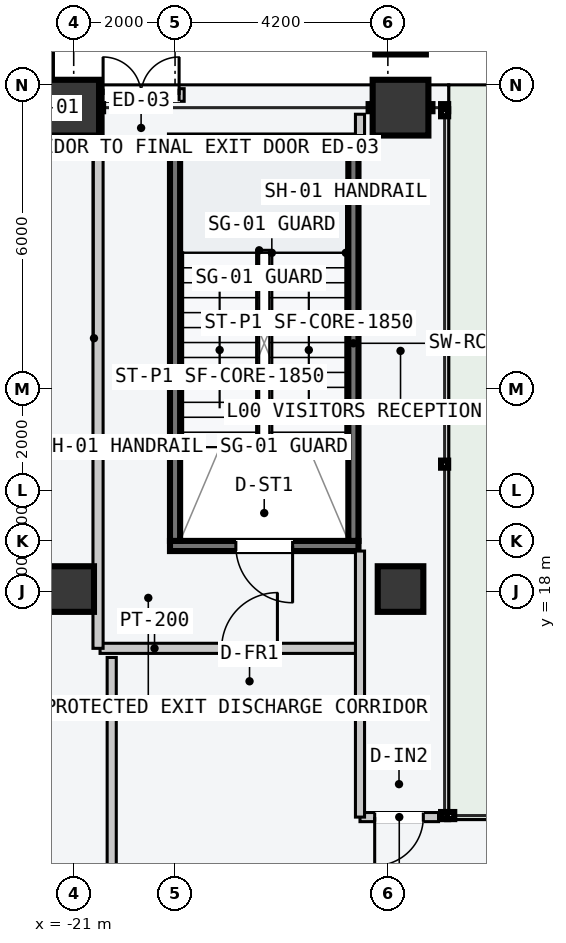
"""IFC4 building model, lengths in metres.
Left out: names, types, materials, properties, quantities, classifications, styles, units other than length and angle.
Written with IfcOpenShell. Run it as: python <this file> out.ifc"""

import sys

from ifc_helpers import new_model, si_unit, direction, frame, frame_2d, origin, origin_2d, place, context, subcontext, project, spatial, rectangle, hollow_rectangle, extrude, element, fill, save


model = new_model("IFC4")
c1 = context("Model", 3, precision=1e-05, world=origin(), true_north=direction((0.0, 1.0)))
c2 = subcontext(c1, "Body", "Model", "MODEL_VIEW")
j1 = project(units=[si_unit("LENGTHUNIT", "METRE"), si_unit("PLANEANGLEUNIT", "RADIAN")], contexts=[c1])
p1 = place(None, origin())
s1 = spatial("IfcSite", under=j1, at=p1, CompositionType="ELEMENT")
p2 = place(p1, origin())
s2 = spatial("IfcBuilding", under=s1, at=p2, CompositionType="ELEMENT")
p3 = place(p2, origin())
s3 = spatial("IfcBuildingStorey", under=s2, at=p3, CompositionType="ELEMENT", Elevation=0.0)
p4 = place(p3, frame((-15.38, 18.9, -0.22), z_axis=(0.0, 0.0, 1.0), x_axis=(-1.0, 0.0, 0.0)))
e1 = element("IfcWall", 1, at=p4, inside=s3, PredefinedType="SOLIDWALL", context=c2, shape_type="SweptSolid", body=[
    extrude(rectangle(XDim=3.72, YDim=0.2, at=frame_2d((1.86, 0.0))), origin(), (0.0, 0.0, 1.0), 4.8),
])
p5 = place(p4, frame((1.3, 0.0, 0.22)))
e2 = element("IfcOpeningElement", 2, at=p5, cuts=e1, PredefinedType="OPENING", context=c2, shape_type="SweptSolid", body=[
    extrude(rectangle(XDim=1.12, YDim=2.18, at=frame_2d((0.56, 1.09))), frame((0.0, 0.11, 0.0), z_axis=(0.0, -1.0, 0.0), x_axis=(1.0, 0.0, 0.0)), (0.0, 0.0, 1.0), 0.22),
])
p6 = place(p3, frame((-19.1, 26.9, -0.22), z_axis=(0.0, 0.0, 1.0), x_axis=(1.0, 0.0, 0.0)))
e3 = element("IfcWall", 3, at=p6, inside=s3, PredefinedType="SOLIDWALL", context=c2, shape_type="SweptSolid", body=[
    extrude(rectangle(XDim=3.72, YDim=0.2, at=frame_2d((1.86, 0.0))), origin(), (0.0, 0.0, 1.0), 4.8),
])
for number, where, z_axis, x_axis in (
    (4, (-19.0, 19.0, -0.22), (0.0, 0.0, 1.0), (0.0, 1.0, 0.0)),
    (5, (-15.48, 19.0, -0.22), (0.0, 0.0, 1.0), (0.0, 1.0, 0.0)),
):
    element("IfcWall", number, at=place(p3, frame(where, z_axis=z_axis, x_axis=x_axis)), inside=s3, PredefinedType="SOLIDWALL", context=c2, shape_type="SweptSolid", body=[
        extrude(rectangle(XDim=7.8, YDim=0.2, at=frame_2d((3.9, 0.0))), origin(), (0.0, 0.0, 1.0), 4.8),
    ])
for number, where, z_axis, x_axis in (
    (6, (-21.05, 18.05, 0.0), (0.0, 0.0, 1.0), (1.0, 0.0, 0.0)),
    (7, (-14.55, 18.05, 0.0), (0.0, 0.0, 1.0), (1.0, 0.0, 0.0)),
):
    element("IfcColumn", number, at=place(p3, frame(where, z_axis=z_axis, x_axis=x_axis)), inside=s3, PredefinedType="COLUMN", context=c2, shape_type="SweptSolid", body=[
        extrude(hollow_rectangle(XDim=0.9, YDim=0.9, WallThickness=0.045, at=origin_2d()), origin(), (0.0, 0.0, 1.0), 4.8),
    ])
for number, where, z_axis, x_axis in (
    (8, (-21.05, 27.55, 0.0), (0.0, 0.0, 1.0), (1.0, 0.0, 0.0)),
    (9, (-14.55, 27.55, 0.0), (0.0, 0.0, 1.0), (1.0, 0.0, 0.0)),
):
    element("IfcColumn", number, at=place(p3, frame(where, z_axis=z_axis, x_axis=x_axis)), inside=s3, PredefinedType="COLUMN", context=c2, shape_type="SweptSolid", body=[
        extrude(hollow_rectangle(XDim=1.1, YDim=1.1, WallThickness=0.055, at=origin_2d()), origin(), (0.0, 0.0, 1.0), 4.8),
    ])
p7 = place(p3, frame((-14.55, 29.1, -0.22), z_axis=(0.0, 0.0, 1.0), x_axis=(1.0, 0.0, 0.0)))
e10 = element("IfcColumn", 10, at=p7, inside=s3, PredefinedType="COLUMN", context=c2, shape_type="SweptSolid", body=[
    extrude(hollow_rectangle(XDim=1.0, YDim=1.0, WallThickness=0.05, at=origin_2d()), origin(), (0.0, 0.0, 1.0), 5.02),
])
p8 = place(p3, frame((-20.48, 16.88, 0.0), z_axis=(0.0, 0.0, 1.0), x_axis=(1.0, 0.0, 0.0)))
e11 = element("IfcWall", 11, at=p8, inside=s3, PredefinedType="PARTITIONING", context=c2, shape_type="SweptSolid", body=[
    extrude(rectangle(XDim=5.1, YDim=0.2, at=frame_2d((2.55, 0.0))), origin(), (0.0, 0.0, 1.0), 4.58),
])
p9 = place(p8, frame((2.4, 0.0, 0.0)))
e12 = element("IfcOpeningElement", 12, at=p9, cuts=e11, PredefinedType="OPENING", context=c2, shape_type="SweptSolid", body=[
    extrude(rectangle(XDim=1.1, YDim=2.15, at=frame_2d((0.55, 1.075))), frame((0.0, 0.11, 0.0), z_axis=(0.0, -1.0, 0.0), x_axis=(1.0, 0.0, 0.0)), (0.0, 0.0, 1.0), 0.22),
])
p10 = place(p3, frame((-20.52, 16.88, 0.0), z_axis=(0.0, 0.0, 1.0), x_axis=(0.0, 1.0, 0.0)))
e13 = element("IfcWall", 13, at=p10, inside=s3, PredefinedType="PARTITIONING", context=c2, shape_type="SweptSolid", body=[
    extrude(rectangle(XDim=10.77, YDim=0.2, at=frame_2d((5.385, 0.0))), origin(), (0.0, 0.0, 1.0), 4.58),
])
p11 = place(p3, frame((-20.25, -20.6, 0.0), z_axis=(0.0, 0.0, 1.0), x_axis=(0.0, 1.0, 0.0)))
e14 = element("IfcWall", 14, at=p11, inside=s3, PredefinedType="PARTITIONING", context=c2, shape_type="SweptSolid", body=[
    extrude(rectangle(XDim=37.3, YDim=0.18, at=frame_2d((18.65, 0.0))), origin(), (0.0, 0.0, 1.0), 4.58),
])
p12 = place(p11, frame((13.925, 0.0, 0.0)))
e15 = element("IfcOpeningElement", 15, at=p12, cuts=e14, PredefinedType="OPENING", context=c2, shape_type="SweptSolid", body=[
    extrude(rectangle(XDim=1.6, YDim=2.3, at=frame_2d((0.8, 1.15))), frame((0.0, 0.1, 0.0), z_axis=(0.0, -1.0, 0.0), x_axis=(1.0, 0.0, 0.0)), (0.0, 0.0, 1.0), 0.2),
])
p13 = place(p11, frame((28.975, 0.0, 0.0)))
e16 = element("IfcOpeningElement", 16, at=p13, cuts=e14, PredefinedType="OPENING", context=c2, shape_type="SweptSolid", body=[
    extrude(rectangle(XDim=1.6, YDim=2.3, at=frame_2d((0.8, 1.15))), frame((0.0, 0.1, 0.0), z_axis=(0.0, -1.0, 0.0), x_axis=(1.0, 0.0, 0.0)), (0.0, 0.0, 1.0), 0.2),
])
p14 = place(p3, frame((-13.8, 13.55, 0.0), z_axis=(0.0, 0.0, 1.0), x_axis=(-1.0, 0.0, 0.0)))
e17 = element("IfcWall", 17, at=p14, inside=s3, PredefinedType="PARTITIONING", context=c2, shape_type="SweptSolid", body=[
    extrude(rectangle(XDim=1.55, YDim=0.18, at=frame_2d((0.775, 0.0))), origin(), (0.0, 0.0, 1.0), 4.58),
])
p15 = place(p14, frame((0.3, 0.0, 0.0)))
e18 = element("IfcOpeningElement", 18, at=p15, cuts=e17, PredefinedType="OPENING", context=c2, shape_type="SweptSolid", body=[
    extrude(rectangle(XDim=0.96, YDim=2.18, at=frame_2d((0.48, 1.09))), frame((0.0, 0.1, 0.0), z_axis=(0.0, -1.0, 0.0), x_axis=(1.0, 0.0, 0.0)), (0.0, 0.0, 1.0), 0.2),
])
p16 = place(p3, frame((-15.35, 13.55, 0.0), z_axis=(0.0, 0.0, 1.0), x_axis=(0.0, 1.0, 0.0)))
e19 = element("IfcWall", 19, at=p16, inside=s3, PredefinedType="PARTITIONING", context=c2, shape_type="SweptSolid", body=[
    extrude(rectangle(XDim=5.25, YDim=0.18, at=frame_2d((2.625, 0.0))), origin(), (0.0, 0.0, 1.0), 4.58),
])
p17 = place(p3, frame((-15.35, 27.0, 0.0), z_axis=(0.0, 0.0, 1.0), x_axis=(0.0, 1.0, 0.0)))
e20 = element("IfcWall", 20, at=p17, inside=s3, PredefinedType="PARTITIONING", context=c2, shape_type="SweptSolid", body=[
    extrude(rectangle(XDim=0.42, YDim=0.18, at=frame_2d((0.21, 0.0))), origin(), (0.0, 0.0, 1.0), 4.58),
])
p18 = place(p3, frame((-20.52, 27.8, 0.0), z_axis=(0.0, 0.0, 1.0), x_axis=(1.0, 0.0, 0.0)))
e21 = element("IfcWall", 21, at=p18, inside=s3, PredefinedType="STANDARD", context=c2, shape_type="SweptSolid", body=[
    extrude(rectangle(XDim=1.7, YDim=0.25, at=frame_2d((0.85, 0.0))), origin(), (0.0, 0.0, 1.0), 4.58),
])
p19 = place(p18, frame((0.1, 0.0, 0.0)))
e22 = element("IfcOpeningElement", 22, at=p19, cuts=e21, PredefinedType="OPENING", context=c2, shape_type="SweptSolid", body=[
    extrude(rectangle(XDim=1.5, YDim=2.4, at=frame_2d((0.75, 1.2))), frame((0.0, 0.135, 0.0), z_axis=(0.0, -1.0, 0.0), x_axis=(1.0, 0.0, 0.0)), (0.0, 0.0, 1.0), 0.27),
])
p20 = place(p5, origin())
e23 = element("IfcDoor", 23, at=p20, inside=s3, OperationType="SINGLE_SWING_LEFT", PredefinedType="DOOR", context=c2, shape_type="SweptSolid", body=[
    extrude(rectangle(XDim=1.12, YDim=2.18, at=frame_2d((0.56, 1.09))), frame((0.0, 0.025, 0.0), z_axis=(0.0, -1.0, 0.0), x_axis=(1.0, 0.0, 0.0)), (0.0, 0.0, 1.0), 0.05),
])
fill(e2, e23)
p21 = place(p9, origin())
e24 = element("IfcDoor", 24, at=p21, inside=s3, OperationType="SINGLE_SWING_RIGHT", PredefinedType="DOOR", context=c2, shape_type="SweptSolid", body=[
    extrude(rectangle(XDim=1.1, YDim=2.15, at=frame_2d((0.55, 1.075))), frame((0.0, 0.025, 0.0), z_axis=(0.0, -1.0, 0.0), x_axis=(1.0, 0.0, 0.0)), (0.0, 0.0, 1.0), 0.05),
])
fill(e12, e24)
p22 = place(p15, origin())
e25 = element("IfcDoor", 25, at=p22, inside=s3, OperationType="SINGLE_SWING_RIGHT", PredefinedType="DOOR", context=c2, shape_type="SweptSolid", body=[
    extrude(rectangle(XDim=0.96, YDim=2.18, at=frame_2d((0.48, 1.09))), frame((0.0, 0.025, 0.0), z_axis=(0.0, -1.0, 0.0), x_axis=(1.0, 0.0, 0.0)), (0.0, 0.0, 1.0), 0.05),
])
fill(e18, e25)
p23 = place(p19, origin())
e26 = element("IfcDoor", 26, at=p23, inside=s3, OperationType="DOUBLE_DOOR_SINGLE_SWING", PredefinedType="DOOR", context=c2, shape_type="SweptSolid", body=[
    extrude(rectangle(XDim=1.5, YDim=2.4, at=frame_2d((0.75, 1.2))), frame((0.0, 0.025, 0.0), z_axis=(0.0, -1.0, 0.0), x_axis=(1.0, 0.0, 0.0)), (0.0, 0.0, 1.0), 0.05),
])
fill(e22, e26)
save(model, sys.argv[1])
